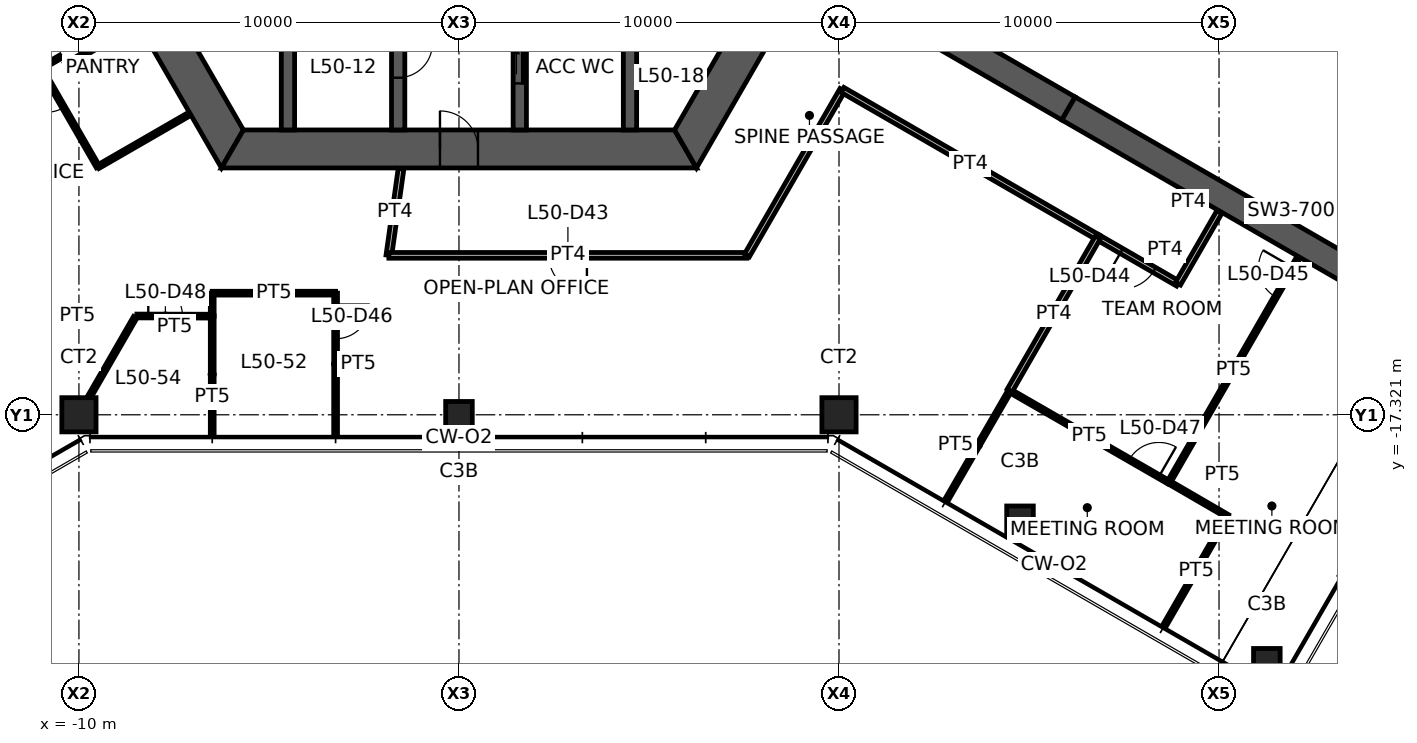
"""IFC4 building model, lengths in metres.
Left out: names, types, materials, properties, quantities, classifications, styles, units other than length and angle.
Written with IfcOpenShell. Run it as: python <this file> out.ifc"""

import sys

from ifc_helpers import new_model, si_unit, direction, frame, frame_2d, origin, origin_2d, place, context, subcontext, project, spatial, polyline, rectangle, hollow_rectangle, outline, extrude, element, fill, save


model = new_model("IFC4")
c1 = context("Model", 3, precision=1e-05, world=origin(), true_north=direction((0.0, 1.0)))
c2 = subcontext(c1, "Body", "Model", "MODEL_VIEW")
j1 = project(units=[si_unit("LENGTHUNIT", "METRE"), si_unit("PLANEANGLEUNIT", "RADIAN")], contexts=[c1])
p1 = place(None, origin())
s1 = spatial("IfcSite", under=j1, at=p1, CompositionType="ELEMENT")
p2 = place(p1, origin())
s2 = spatial("IfcBuilding", under=s1, at=p2, CompositionType="ELEMENT")
p3 = place(p2, frame((0.0, 0.0, 199.4)))
s3 = spatial("IfcBuildingStorey", under=s2, at=p3, CompositionType="ELEMENT", Elevation=199.4)
for number, where, z_axis, x_axis in (
    (1, (-10.0, -17.321, 0.0), (0.0, 0.0, 1.0), (1.0, 0.0, 0.0)),
    (2, (10.0, -17.321, 0.0), (0.0, 0.0, 1.0), (1.0, 0.0, 0.0)),
):
    element("IfcColumn", number, at=place(p3, frame(where, z_axis=z_axis, x_axis=x_axis)), inside=s3, PredefinedType="COLUMN", context=c2, shape_type="SweptSolid", body=[
        extrude(hollow_rectangle(XDim=0.9, YDim=0.9, WallThickness=0.09, at=origin_2d()), origin(), (0.0, 0.0, 1.0), 3.9),
    ])
for number, where, z_axis, x_axis in (
    (3, (0.0, -17.321, 0.0), (0.0, 0.0, 1.0), (1.0, 0.0, 0.0)),
    (4, (14.763, -20.071, 0.0), (0.0, 0.0, 1.0), (1.0, 0.0, 0.0)),
    (5, (21.258, -23.821, 0.0), (0.0, 0.0, 1.0), (1.0, 0.0, 0.0)),
):
    element("IfcColumn", number, at=place(p3, frame(where, z_axis=z_axis, x_axis=x_axis)), inside=s3, PredefinedType="COLUMN", context=c2, shape_type="SweptSolid", body=[
        extrude(hollow_rectangle(XDim=0.7, YDim=0.7, WallThickness=0.036, at=origin_2d()), origin(), (0.0, 0.0, 1.0), 3.9),
    ])
p4 = place(p3, frame((-11.922, 0.0, 0.0), z_axis=(0.0, 0.0, 1.0), x_axis=(0.500004296715, -0.866022923061, 0.0)))
e6 = element("IfcWall", 6, at=p4, inside=s3, PredefinedType="SHEAR", context=c2, shape_type="SweptSolid", body=[
    extrude(outline(polyline([(-0.289, -0.5), (6.331, -0.5), (7.131, -0.5), (12.211, -0.5), (11.634, 0.5), (7.131, 0.5), (6.331, 0.5), (0.289, 0.5), (-0.289, -0.5)])), origin(), (0.0, 0.0, 1.0), 3.9),
])
p5 = place(p4, frame((6.331, 0.0, 0.0)))
e7 = element("IfcOpeningElement", 7, at=p5, cuts=e6, PredefinedType="OPENING", context=c2, shape_type="SweptSolid", body=[
    extrude(rectangle(XDim=0.8, YDim=2.1, at=frame_2d((0.4, 1.05))), frame((0.0, 0.51, 0.0), z_axis=(0.0, -1.0, 0.0), x_axis=(1.0, 0.0, 0.0)), (0.0, 0.0, 1.0), 1.02),
])
p6 = place(p3, frame((-5.961, -10.325, 0.0), z_axis=(0.0, 0.0, 1.0), x_axis=(1.0, 0.0, 0.0)))
e8 = element("IfcWall", 8, at=p6, inside=s3, PredefinedType="SHEAR", context=c2, shape_type="SweptSolid", body=[
    extrude(outline(polyline([(-0.289, -0.5), (5.461, -0.5), (6.461, -0.5), (12.211, -0.5), (11.634, 0.5), (6.461, 0.5), (5.461, 0.5), (0.289, 0.5), (-0.289, -0.5)])), origin(), (0.0, 0.0, 1.0), 3.9),
])
p7 = place(p6, frame((5.461, 0.0, 0.0)))
e9 = element("IfcOpeningElement", 9, at=p7, cuts=e8, PredefinedType="OPENING", context=c2, shape_type="SweptSolid", body=[
    extrude(rectangle(XDim=1.0, YDim=2.1, at=frame_2d((0.5, 1.05))), frame((0.0, 0.51, 0.0), z_axis=(0.0, -1.0, 0.0), x_axis=(1.0, 0.0, 0.0)), (0.0, 0.0, 1.0), 1.02),
])
p8 = place(p3, frame((5.961, -10.325, 0.0), z_axis=(0.0, 0.0, 1.0), x_axis=(0.500004296715, 0.866022923061, 0.0)))
e10 = element("IfcWall", 10, at=p8, inside=s3, PredefinedType="SHEAR", context=c2, shape_type="SweptSolid", body=[
    extrude(outline(polyline([(-0.289, -0.5), (4.594, -0.5), (5.394, -0.5), (12.211, -0.5), (11.634, 0.5), (5.394, 0.5), (4.594, 0.5), (0.289, 0.5), (-0.289, -0.5)])), origin(), (0.0, 0.0, 1.0), 3.9),
])
p9 = place(p8, frame((4.594, 0.0, 0.0)))
e11 = element("IfcOpeningElement", 11, at=p9, cuts=e10, PredefinedType="OPENING", context=c2, shape_type="SweptSolid", body=[
    extrude(rectangle(XDim=0.8, YDim=2.1, at=frame_2d((0.4, 1.05))), frame((0.0, 0.51, 0.0), z_axis=(0.0, -1.0, 0.0), x_axis=(1.0, 0.0, 0.0)), (0.0, 0.0, 1.0), 1.02),
])
p10 = place(p3, frame((-9.375, -5.413, 0.0), z_axis=(0.0, 0.0, 1.0), x_axis=(-0.866032377459, -0.499987921047, 0.0)))
e12 = element("IfcWall", 12, at=p10, inside=s3, PredefinedType="SHEAR", context=c2, shape_type="SweptSolid", body=[
    extrude(rectangle(XDim=7.696, YDim=0.7, at=frame_2d((3.848, 0.0))), origin(), (0.0, 0.0, 1.0), 3.9),
])
p11 = place(p10, frame((0.9, 0.0, 0.0)))
e13 = element("IfcOpeningElement", 13, at=p11, cuts=e12, PredefinedType="OPENING", context=c2, shape_type="SweptSolid", body=[
    extrude(rectangle(XDim=1.0, YDim=2.1, at=frame_2d((0.5, 1.05))), frame((0.0, 0.36, 0.0), z_axis=(0.0, -1.0, 0.0), x_axis=(1.0, 0.0, 0.0)), (0.0, 0.0, 1.0), 0.72),
])
p12 = place(p3, frame((9.375, -5.413, 0.0), z_axis=(0.0, 0.0, 1.0), x_axis=(0.866032377459, -0.499987921047, 0.0)))
e14 = element("IfcWall", 14, at=p12, inside=s3, PredefinedType="SHEAR", context=c2, shape_type="SweptSolid", body=[
    extrude(rectangle(XDim=7.696, YDim=0.7, at=frame_2d((3.848, 0.0))), origin(), (0.0, 0.0, 1.0), 3.9),
])
p13 = place(p12, frame((0.9, 0.0, 0.0)))
e15 = element("IfcOpeningElement", 15, at=p13, cuts=e14, PredefinedType="OPENING", context=c2, shape_type="SweptSolid", body=[
    extrude(rectangle(XDim=1.0, YDim=2.1, at=frame_2d((0.5, 1.05))), frame((0.0, 0.36, 0.0), z_axis=(0.0, -1.0, 0.0), x_axis=(1.0, 0.0, 0.0)), (0.0, 0.0, 1.0), 0.72),
])
p14 = place(p3, frame((16.039, -9.26, 0.0), z_axis=(0.0, 0.0, 1.0), x_axis=(0.866024837091, -0.50000098154, 0.0)))
e16 = element("IfcWall", 16, at=p14, inside=s3, PredefinedType="SHEAR", context=c2, shape_type="SweptSolid", body=[
    extrude(rectangle(XDim=13.0, YDim=0.7, at=frame_2d((6.5, 0.0))), origin(), (0.0, 0.0, 1.0), 3.9),
])
p15 = place(p3, frame((-1.6, -3.775, 0.0), z_axis=(0.0, 0.0, 1.0), x_axis=(0.0, -1.0, 0.0)))
e17 = element("IfcWall", 17, at=p15, inside=s3, PredefinedType="SHEAR", context=c2, shape_type="SweptSolid", body=[
    extrude(rectangle(XDim=6.05, YDim=0.35, at=frame_2d((3.025, 0.0))), origin(), (0.0, 0.0, 1.0), 3.9),
])
p16 = place(p15, frame((3.775, 0.0, 0.0)))
e18 = element("IfcOpeningElement", 18, at=p16, cuts=e17, PredefinedType="OPENING", context=c2, shape_type="SweptSolid", body=[
    extrude(rectangle(XDim=0.9, YDim=2.1, at=frame_2d((0.45, 1.05))), frame((0.0, 0.185, 0.0), z_axis=(0.0, -1.0, 0.0), x_axis=(1.0, 0.0, 0.0)), (0.0, 0.0, 1.0), 0.37),
])
p17 = place(p3, frame((1.6, -3.775, 0.0), z_axis=(0.0, 0.0, 1.0), x_axis=(0.0, -1.0, 0.0)))
e19 = element("IfcWall", 19, at=p17, inside=s3, PredefinedType="SHEAR", context=c2, shape_type="SweptSolid", body=[
    extrude(rectangle(XDim=6.05, YDim=0.35, at=frame_2d((3.025, 0.0))), origin(), (0.0, 0.0, 1.0), 3.9),
])
p18 = place(p17, frame((3.625, 0.0, 0.0)))
e20 = element("IfcOpeningElement", 20, at=p18, cuts=e19, PredefinedType="OPENING", context=c2, shape_type="SweptSolid", body=[
    extrude(rectangle(XDim=1.2, YDim=2.1, at=frame_2d((0.6, 1.05))), frame((0.0, 0.185, 0.0), z_axis=(0.0, -1.0, 0.0), x_axis=(1.0, 0.0, 0.0)), (0.0, 0.0, 1.0), 0.37),
])
for number, where, z_axis, x_axis in (
    (21, (-4.5, -3.775, 0.0), (0.0, 0.0, 1.0), (0.0, -1.0, 0.0)),
    (22, (4.5, -3.775, 0.0), (0.0, 0.0, 1.0), (0.0, -1.0, 0.0)),
):
    element("IfcWall", number, at=place(p3, frame(where, z_axis=z_axis, x_axis=x_axis)), inside=s3, PredefinedType="SHEAR", context=c2, shape_type="SweptSolid", body=[
        extrude(rectangle(XDim=6.05, YDim=0.35, at=frame_2d((3.025, 0.0))), origin(), (0.0, 0.0, 1.0), 3.9),
    ])
p19 = place(p3, frame((-11.0, -8.198, 0.0), z_axis=(0.0, 0.0, 1.0), x_axis=(0.866131372301, 0.499816412211, 0.0)))
e23 = element("IfcWall", 23, at=p19, inside=s3, PredefinedType="PARTITIONING", context=c2, shape_type="SweptSolid", body=[
    extrude(rectangle(XDim=0.6, YDim=0.1, at=frame_2d((0.3, 0.0))), origin(), (0.0, 0.0, 1.0), 2.35),
])
p20 = place(p3, frame((-10.355, -8.115, 0.0), z_axis=(0.0, 0.0, 1.0), x_axis=(0.866094119867, 0.499880961361, 0.0)))
e24 = element("IfcWall", 24, at=p20, inside=s3, PredefinedType="PARTITIONING", context=c2, shape_type="SweptSolid", body=[
    extrude(rectangle(XDim=1.6, YDim=0.1, at=frame_2d((0.8, 0.0))), origin(), (0.0, 0.0, 1.0), 2.35),
])
p21 = place(p3, frame((-9.5, -10.796, 0.0), z_axis=(0.0, 0.0, 1.0), x_axis=(-0.499990139034, 0.866031096941, 0.0)))
e25 = element("IfcWall", 25, at=p21, inside=s3, PredefinedType="PARTITIONING", context=c2, shape_type="SweptSolid", body=[
    extrude(rectangle(XDim=3.0, YDim=0.1, at=frame_2d((1.5, 0.0))), origin(), (0.0, 0.0, 1.0), 2.35),
])
p22 = place(p21, frame((1.8, 0.0, 0.0)))
e26 = element("IfcOpeningElement", 26, at=p22, cuts=e25, PredefinedType="OPENING", context=c2, shape_type="SweptSolid", body=[
    extrude(rectangle(XDim=0.9, YDim=2.1, at=frame_2d((0.45, 1.05))), frame((0.0, 0.06, 0.0), z_axis=(0.0, -1.0, 0.0), x_axis=(1.0, 0.0, 0.0)), (0.0, 0.0, 1.0), 0.12),
])
p23 = place(p3, frame((-7.092, -9.406, 0.0), z_axis=(0.0, 0.0, 1.0), x_axis=(-0.86603494908, -0.499983466698, 0.0)))
e27 = element("IfcWall", 27, at=p23, inside=s3, PredefinedType="PARTITIONING", context=c2, shape_type="SweptSolid", body=[
    extrude(rectangle(XDim=2.78, YDim=0.1, at=frame_2d((1.39, 0.0))), origin(), (0.0, 0.0, 1.0), 2.35),
])
p24 = place(p3, frame((26.527, -9.075, 0.0), z_axis=(0.0, 0.0, 1.0), x_axis=(-0.866343956507, 0.499447844147, 0.0)))
e28 = element("IfcWall", 28, at=p24, inside=s3, PredefinedType="PARTITIONING", context=c2, shape_type="SweptSolid", body=[
    extrude(rectangle(XDim=6.62, YDim=0.1, at=frame_2d((3.31, 0.0))), origin(), (0.0, 0.0, 1.0), 2.35),
])
p25 = place(p24, frame((5.42, 0.0, 0.0)))
e29 = element("IfcOpeningElement", 29, at=p25, cuts=e28, PredefinedType="OPENING", context=c2, shape_type="SweptSolid", body=[
    extrude(rectangle(XDim=0.9, YDim=2.1, at=frame_2d((0.45, 1.05))), frame((0.0, 0.06, 0.0), z_axis=(0.0, -1.0, 0.0), x_axis=(1.0, 0.0, 0.0)), (0.0, 0.0, 1.0), 0.12),
])
p26 = place(p3, frame((-1.844, -13.125, 0.0), z_axis=(0.0, 0.0, 1.0), x_axis=(0.139119980631, 0.990275532864, 0.0)))
e30 = element("IfcWall", 30, at=p26, inside=s3, PredefinedType="PARTITIONING", context=c2, shape_type="SweptSolid", body=[
    extrude(rectangle(XDim=2.302, YDim=0.15, at=frame_2d((1.151, 0.0))), origin(), (0.0, 0.0, 1.0), 2.35),
])
p27 = place(p3, frame((7.578, -13.125, 0.0), z_axis=(0.0, 0.0, 1.0), x_axis=(-1.0, 0.0, 0.0)))
e31 = element("IfcWall", 31, at=p27, inside=s3, PredefinedType="PARTITIONING", context=c2, shape_type="SweptSolid", body=[
    extrude(rectangle(XDim=9.422, YDim=0.15, at=frame_2d((4.711, 0.0))), origin(), (0.0, 0.0, 1.0), 2.35),
])
p28 = place(p27, frame((4.211, 0.0, 0.0)))
e32 = element("IfcOpeningElement", 32, at=p28, cuts=e31, PredefinedType="OPENING", context=c2, shape_type="SweptSolid", body=[
    extrude(rectangle(XDim=1.0, YDim=2.1, at=frame_2d((0.5, 1.05))), frame((0.0, 0.085, 0.0), z_axis=(0.0, -1.0, 0.0), x_axis=(1.0, 0.0, 0.0)), (0.0, 0.0, 1.0), 0.17),
])
p29 = place(p3, frame((10.092, -8.771, 0.0), z_axis=(0.0, 0.0, 1.0), x_axis=(-0.500019495363, -0.866014147839, 0.0)))
e33 = element("IfcWall", 33, at=p29, inside=s3, PredefinedType="PARTITIONING", context=c2, shape_type="SweptSolid", body=[
    extrude(rectangle(XDim=5.028, YDim=0.15, at=frame_2d((2.514, 0.0))), origin(), (0.0, 0.0, 1.0), 2.35),
])
p30 = place(p3, frame((16.822, -12.656, 0.0), z_axis=(0.0, 0.0, 1.0), x_axis=(-0.866028634939, 0.499994403434, 0.0)))
e34 = element("IfcWall", 34, at=p30, inside=s3, PredefinedType="PARTITIONING", context=c2, shape_type="SweptSolid", body=[
    extrude(rectangle(XDim=7.771, YDim=0.15, at=frame_2d((3.885, 0.0))), origin(), (0.0, 0.0, 1.0), 2.35),
])
p31 = place(p3, frame((18.921, -13.869, 0.0), z_axis=(0.0, 0.0, 1.0), x_axis=(-0.866000196749, 0.500043657324, 0.0)))
e35 = element("IfcWall", 35, at=p31, inside=s3, PredefinedType="PARTITIONING", context=c2, shape_type="SweptSolid", body=[
    extrude(rectangle(XDim=2.434, YDim=0.15, at=frame_2d((1.217, 0.0))), origin(), (0.0, 0.0, 1.0), 2.35),
])
p32 = place(p31, frame((0.717, 0.0, 0.0)))
e36 = element("IfcOpeningElement", 36, at=p32, cuts=e35, PredefinedType="OPENING", context=c2, shape_type="SweptSolid", body=[
    extrude(rectangle(XDim=1.0, YDim=2.1, at=frame_2d((0.5, 1.05))), frame((0.0, 0.085, 0.0), z_axis=(0.0, -1.0, 0.0), x_axis=(1.0, 0.0, 0.0)), (0.0, 0.0, 1.0), 0.17),
])
p33 = place(p3, frame((20.011, -11.981, 0.0), z_axis=(0.0, 0.0, 1.0), x_axis=(-0.500029427677, -0.866008413041, 0.0)))
e37 = element("IfcWall", 37, at=p33, inside=s3, PredefinedType="PARTITIONING", context=c2, shape_type="SweptSolid", body=[
    extrude(rectangle(XDim=2.18, YDim=0.15, at=frame_2d((1.09, 0.0))), origin(), (0.0, 0.0, 1.0), 2.35),
])
p34 = place(p3, frame((18.573, -22.853, 0.0), z_axis=(0.0, 0.0, 1.0), x_axis=(0.499920671713, 0.866071199148, 0.0)))
e38 = element("IfcWall", 38, at=p34, inside=s3, PredefinedType="PARTITIONING", context=c2, shape_type="SweptSolid", body=[
    extrude(rectangle(XDim=3.305, YDim=0.1, at=frame_2d((1.653, 0.0))), origin(), (0.0, 0.0, 1.0), 2.35),
])
p35 = place(p3, frame((20.225, -19.991, 0.0), z_axis=(0.0, 0.0, 1.0), x_axis=(-0.864647633554, 0.502378811047, 0.0)))
e39 = element("IfcWall", 39, at=p35, inside=s3, PredefinedType="PARTITIONING", context=c2, shape_type="SweptSolid", body=[
    extrude(rectangle(XDim=1.791, YDim=0.1, at=frame_2d((0.896, 0.0))), origin(), (0.0, 0.0, 1.0), 2.35),
])
p36 = place(p3, frame((18.678, -19.097, 0.0), z_axis=(0.0, 0.0, 1.0), x_axis=(0.499488276661, 0.86632064588, 0.0)))
e40 = element("IfcWall", 40, at=p36, inside=s3, PredefinedType="PARTITIONING", context=c2, shape_type="SweptSolid", body=[
    extrude(rectangle(XDim=6.83, YDim=0.1, at=frame_2d((3.415, 0.0))), origin(), (0.0, 0.0, 1.0), 2.35),
])
p37 = place(p36, frame((5.63, 0.0, 0.0)))
e41 = element("IfcOpeningElement", 41, at=p37, cuts=e40, PredefinedType="OPENING", context=c2, shape_type="SweptSolid", body=[
    extrude(rectangle(XDim=0.9, YDim=2.1, at=frame_2d((0.45, 1.05))), frame((0.0, 0.06, 0.0), z_axis=(0.0, -1.0, 0.0), x_axis=(1.0, 0.0, 0.0)), (0.0, 0.0, 1.0), 0.12),
])
p38 = place(p3, frame((-6.493, -17.801, 0.0), z_axis=(0.0, 0.0, 1.0), x_axis=(0.0, 1.0, 0.0)))
e42 = element("IfcWall", 42, at=p38, inside=s3, PredefinedType="PARTITIONING", context=c2, shape_type="SweptSolid", body=[
    extrude(rectangle(XDim=3.085, YDim=0.1, at=frame_2d((1.542, 0.0))), origin(), (0.0, 0.0, 1.0), 2.35),
])
p39 = place(p3, frame((-6.493, -14.725, 0.0), z_axis=(0.0, 0.0, 1.0), x_axis=(0.0, 1.0, 0.0)))
e43 = element("IfcWall", 43, at=p39, inside=s3, PredefinedType="PARTITIONING", context=c2, shape_type="SweptSolid", body=[
    extrude(rectangle(XDim=0.604, YDim=0.1, at=frame_2d((0.302, 0.0))), origin(), (0.0, 0.0, 1.0), 2.35),
])
p40 = place(p3, frame((-6.493, -14.121, 0.0), z_axis=(0.0, 0.0, 1.0), x_axis=(1.0, 0.0, 0.0)))
e44 = element("IfcWall", 44, at=p40, inside=s3, PredefinedType="PARTITIONING", context=c2, shape_type="SweptSolid", body=[
    extrude(rectangle(XDim=3.247, YDim=0.1, at=frame_2d((1.623, 0.0))), origin(), (0.0, 0.0, 1.0), 2.35),
])
p41 = place(p3, frame((-3.246, -14.121, 0.0), z_axis=(0.0, 0.0, 1.0), x_axis=(0.0, -1.0, 0.0)))
e45 = element("IfcWall", 45, at=p41, inside=s3, PredefinedType="PARTITIONING", context=c2, shape_type="SweptSolid", body=[
    extrude(rectangle(XDim=3.73, YDim=0.1, at=frame_2d((1.865, 0.0))), origin(), (0.0, 0.0, 1.0), 2.35),
])
p42 = place(p41, frame((0.3, 0.0, 0.0)))
e46 = element("IfcOpeningElement", 46, at=p42, cuts=e45, PredefinedType="OPENING", context=c2, shape_type="SweptSolid", body=[
    extrude(rectangle(XDim=0.9, YDim=2.1, at=frame_2d((0.45, 1.05))), frame((0.0, 0.06, 0.0), z_axis=(0.0, -1.0, 0.0), x_axis=(1.0, 0.0, 0.0)), (0.0, 0.0, 1.0), 0.12),
])
p43 = place(p3, frame((12.84, -19.543, 0.0), z_axis=(0.0, 0.0, 1.0), x_axis=(0.501269197563, 0.865291391136, 0.0)))
e47 = element("IfcWall", 47, at=p43, inside=s3, PredefinedType="PARTITIONING", context=c2, shape_type="SweptSolid", body=[
    extrude(rectangle(XDim=3.305, YDim=0.1, at=frame_2d((1.653, 0.0))), origin(), (0.0, 0.0, 1.0), 2.35),
])
p44 = place(p3, frame((14.49, -16.685, 0.0), z_axis=(0.0, 0.0, 1.0), x_axis=(0.866481441777, -0.499209285827, 0.0)))
e48 = element("IfcWall", 48, at=p44, inside=s3, PredefinedType="PARTITIONING", context=c2, shape_type="SweptSolid", body=[
    extrude(rectangle(XDim=4.833, YDim=0.1, at=frame_2d((2.417, 0.0))), origin(), (0.0, 0.0, 1.0), 2.35),
])
p45 = place(p44, frame((3.633, 0.0, 0.0)))
e49 = element("IfcOpeningElement", 49, at=p45, cuts=e48, PredefinedType="OPENING", context=c2, shape_type="SweptSolid", body=[
    extrude(rectangle(XDim=0.9, YDim=2.1, at=frame_2d((0.45, 1.05))), frame((0.0, 0.06, 0.0), z_axis=(0.0, -1.0, 0.0), x_axis=(1.0, 0.0, 0.0)), (0.0, 0.0, 1.0), 0.12),
])
p46 = place(p3, frame((-8.476, -14.72, 0.0), z_axis=(0.0, 0.0, 1.0), x_axis=(0.99999726379, -0.002339318888, 0.0)))
e50 = element("IfcWall", 50, at=p46, inside=s3, PredefinedType="PARTITIONING", context=c2, shape_type="SweptSolid", body=[
    extrude(rectangle(XDim=1.983, YDim=0.1, at=frame_2d((0.991, 0.0))), origin(), (0.0, 0.0, 1.0), 2.35),
])
p47 = place(p46, frame((0.3, 0.0, 0.0)))
e51 = element("IfcOpeningElement", 51, at=p47, cuts=e50, PredefinedType="OPENING", context=c2, shape_type="SweptSolid", body=[
    extrude(rectangle(XDim=0.9, YDim=2.1, at=frame_2d((0.45, 1.05))), frame((0.0, 0.06, 0.0), z_axis=(0.0, -1.0, 0.0), x_axis=(1.0, 0.0, 0.0)), (0.0, 0.0, 1.0), 0.12),
])
p48 = place(p3, frame((16.812, -12.652, 0.0), z_axis=(0.0, 0.0, 1.0), x_axis=(-0.499085020987, -0.86655302309, 0.0)))
e52 = element("IfcWall", 52, at=p48, inside=s3, PredefinedType="PARTITIONING", context=c2, shape_type="SweptSolid", body=[
    extrude(rectangle(XDim=4.654, YDim=0.15, at=frame_2d((2.327, 0.0))), origin(), (0.0, 0.0, 1.0), 2.35),
])
p49 = place(p3, frame((-9.759, -16.904, 0.0), z_axis=(0.0, 0.0, 1.0), x_axis=(0.500049399443, 0.865996881124, 0.0)))
e53 = element("IfcWall", 53, at=p49, inside=s3, PredefinedType="PARTITIONING", context=c2, shape_type="SweptSolid", body=[
    extrude(rectangle(XDim=2.478, YDim=0.1, at=frame_2d((1.239, 0.0))), origin(), (0.0, 0.0, 1.0), 2.35),
])
p50 = place(p7, origin())
e54 = element("IfcDoor", 54, at=p50, inside=s3, OperationType="SINGLE_SWING_LEFT", PredefinedType="DOOR", context=c2, shape_type="SweptSolid", body=[
    extrude(rectangle(XDim=1.0, YDim=2.1, at=frame_2d((0.5, 1.05))), frame((0.0, 0.025, 0.0), z_axis=(0.0, -1.0, 0.0), x_axis=(1.0, 0.0, 0.0)), (0.0, 0.0, 1.0), 0.05),
])
fill(e9, e54)
p51 = place(p18, origin())
e55 = element("IfcDoor", 55, at=p51, inside=s3, OperationType="SLIDING_TO_LEFT", PredefinedType="DOOR", context=c2, shape_type="SweptSolid", body=[
    extrude(rectangle(XDim=1.2, YDim=2.1, at=frame_2d((0.6, 1.05))), frame((0.0, 0.025, 0.0), z_axis=(0.0, -1.0, 0.0), x_axis=(1.0, 0.0, 0.0)), (0.0, 0.0, 1.0), 0.05),
])
fill(e20, e55)
p52 = place(p16, origin())
e56 = element("IfcDoor", 56, at=p52, inside=s3, OperationType="SINGLE_SWING_LEFT", PredefinedType="DOOR", context=c2, shape_type="SweptSolid", body=[
    extrude(rectangle(XDim=0.9, YDim=2.1, at=frame_2d((0.45, 1.05))), frame((0.0, 0.025, 0.0), z_axis=(0.0, -1.0, 0.0), x_axis=(1.0, 0.0, 0.0)), (0.0, 0.0, 1.0), 0.05),
])
fill(e18, e56)
p53 = place(p22, origin())
e57 = element("IfcDoor", 57, at=p53, inside=s3, OperationType="SINGLE_SWING_RIGHT", PredefinedType="DOOR", context=c2, shape_type="SweptSolid", body=[
    extrude(rectangle(XDim=0.9, YDim=2.1, at=frame_2d((0.45, 1.05))), frame((0.0, 0.025, 0.0), z_axis=(0.0, -1.0, 0.0), x_axis=(1.0, 0.0, 0.0)), (0.0, 0.0, 1.0), 0.05),
])
fill(e26, e57)
p54 = place(p28, origin())
e58 = element("IfcDoor", 58, at=p54, inside=s3, OperationType="SINGLE_SWING_LEFT", PredefinedType="DOOR", context=c2, shape_type="SweptSolid", body=[
    extrude(rectangle(XDim=1.0, YDim=2.1, at=frame_2d((0.5, 1.05))), frame((0.0, 0.025, 0.0), z_axis=(0.0, -1.0, 0.0), x_axis=(1.0, 0.0, 0.0)), (0.0, 0.0, 1.0), 0.05),
])
fill(e32, e58)
p55 = place(p32, origin())
e59 = element("IfcDoor", 59, at=p55, inside=s3, OperationType="SINGLE_SWING_RIGHT", PredefinedType="DOOR", context=c2, shape_type="SweptSolid", body=[
    extrude(rectangle(XDim=1.0, YDim=2.1, at=frame_2d((0.5, 1.05))), frame((0.0, 0.025, 0.0), z_axis=(0.0, -1.0, 0.0), x_axis=(1.0, 0.0, 0.0)), (0.0, 0.0, 1.0), 0.05),
])
fill(e36, e59)
p56 = place(p37, origin())
e60 = element("IfcDoor", 60, at=p56, inside=s3, OperationType="SINGLE_SWING_RIGHT", PredefinedType="DOOR", context=c2, shape_type="SweptSolid", body=[
    extrude(rectangle(XDim=0.9, YDim=2.1, at=frame_2d((0.45, 1.05))), frame((0.0, 0.025, 0.0), z_axis=(0.0, -1.0, 0.0), x_axis=(1.0, 0.0, 0.0)), (0.0, 0.0, 1.0), 0.05),
])
fill(e41, e60)
p57 = place(p42, origin())
e61 = element("IfcDoor", 61, at=p57, inside=s3, OperationType="SINGLE_SWING_LEFT", PredefinedType="DOOR", context=c2, shape_type="SweptSolid", body=[
    extrude(rectangle(XDim=0.9, YDim=2.1, at=frame_2d((0.45, 1.05))), frame((0.0, 0.025, 0.0), z_axis=(0.0, -1.0, 0.0), x_axis=(1.0, 0.0, 0.0)), (0.0, 0.0, 1.0), 0.05),
])
fill(e46, e61)
p58 = place(p45, origin())
e62 = element("IfcDoor", 62, at=p58, inside=s3, OperationType="SINGLE_SWING_RIGHT", PredefinedType="DOOR", context=c2, shape_type="SweptSolid", body=[
    extrude(rectangle(XDim=0.9, YDim=2.1, at=frame_2d((0.45, 1.05))), frame((0.0, 0.025, 0.0), z_axis=(0.0, -1.0, 0.0), x_axis=(1.0, 0.0, 0.0)), (0.0, 0.0, 1.0), 0.05),
])
fill(e49, e62)
p59 = place(p47, origin())
e63 = element("IfcDoor", 63, at=p59, inside=s3, OperationType="SINGLE_SWING_LEFT", PredefinedType="DOOR", context=c2, shape_type="SweptSolid", body=[
    extrude(rectangle(XDim=0.9, YDim=2.1, at=frame_2d((0.45, 1.05))), frame((0.0, 0.025, 0.0), z_axis=(0.0, -1.0, 0.0), x_axis=(1.0, 0.0, 0.0)), (0.0, 0.0, 1.0), 0.05),
])
fill(e51, e63)
save(model, sys.argv[1])
